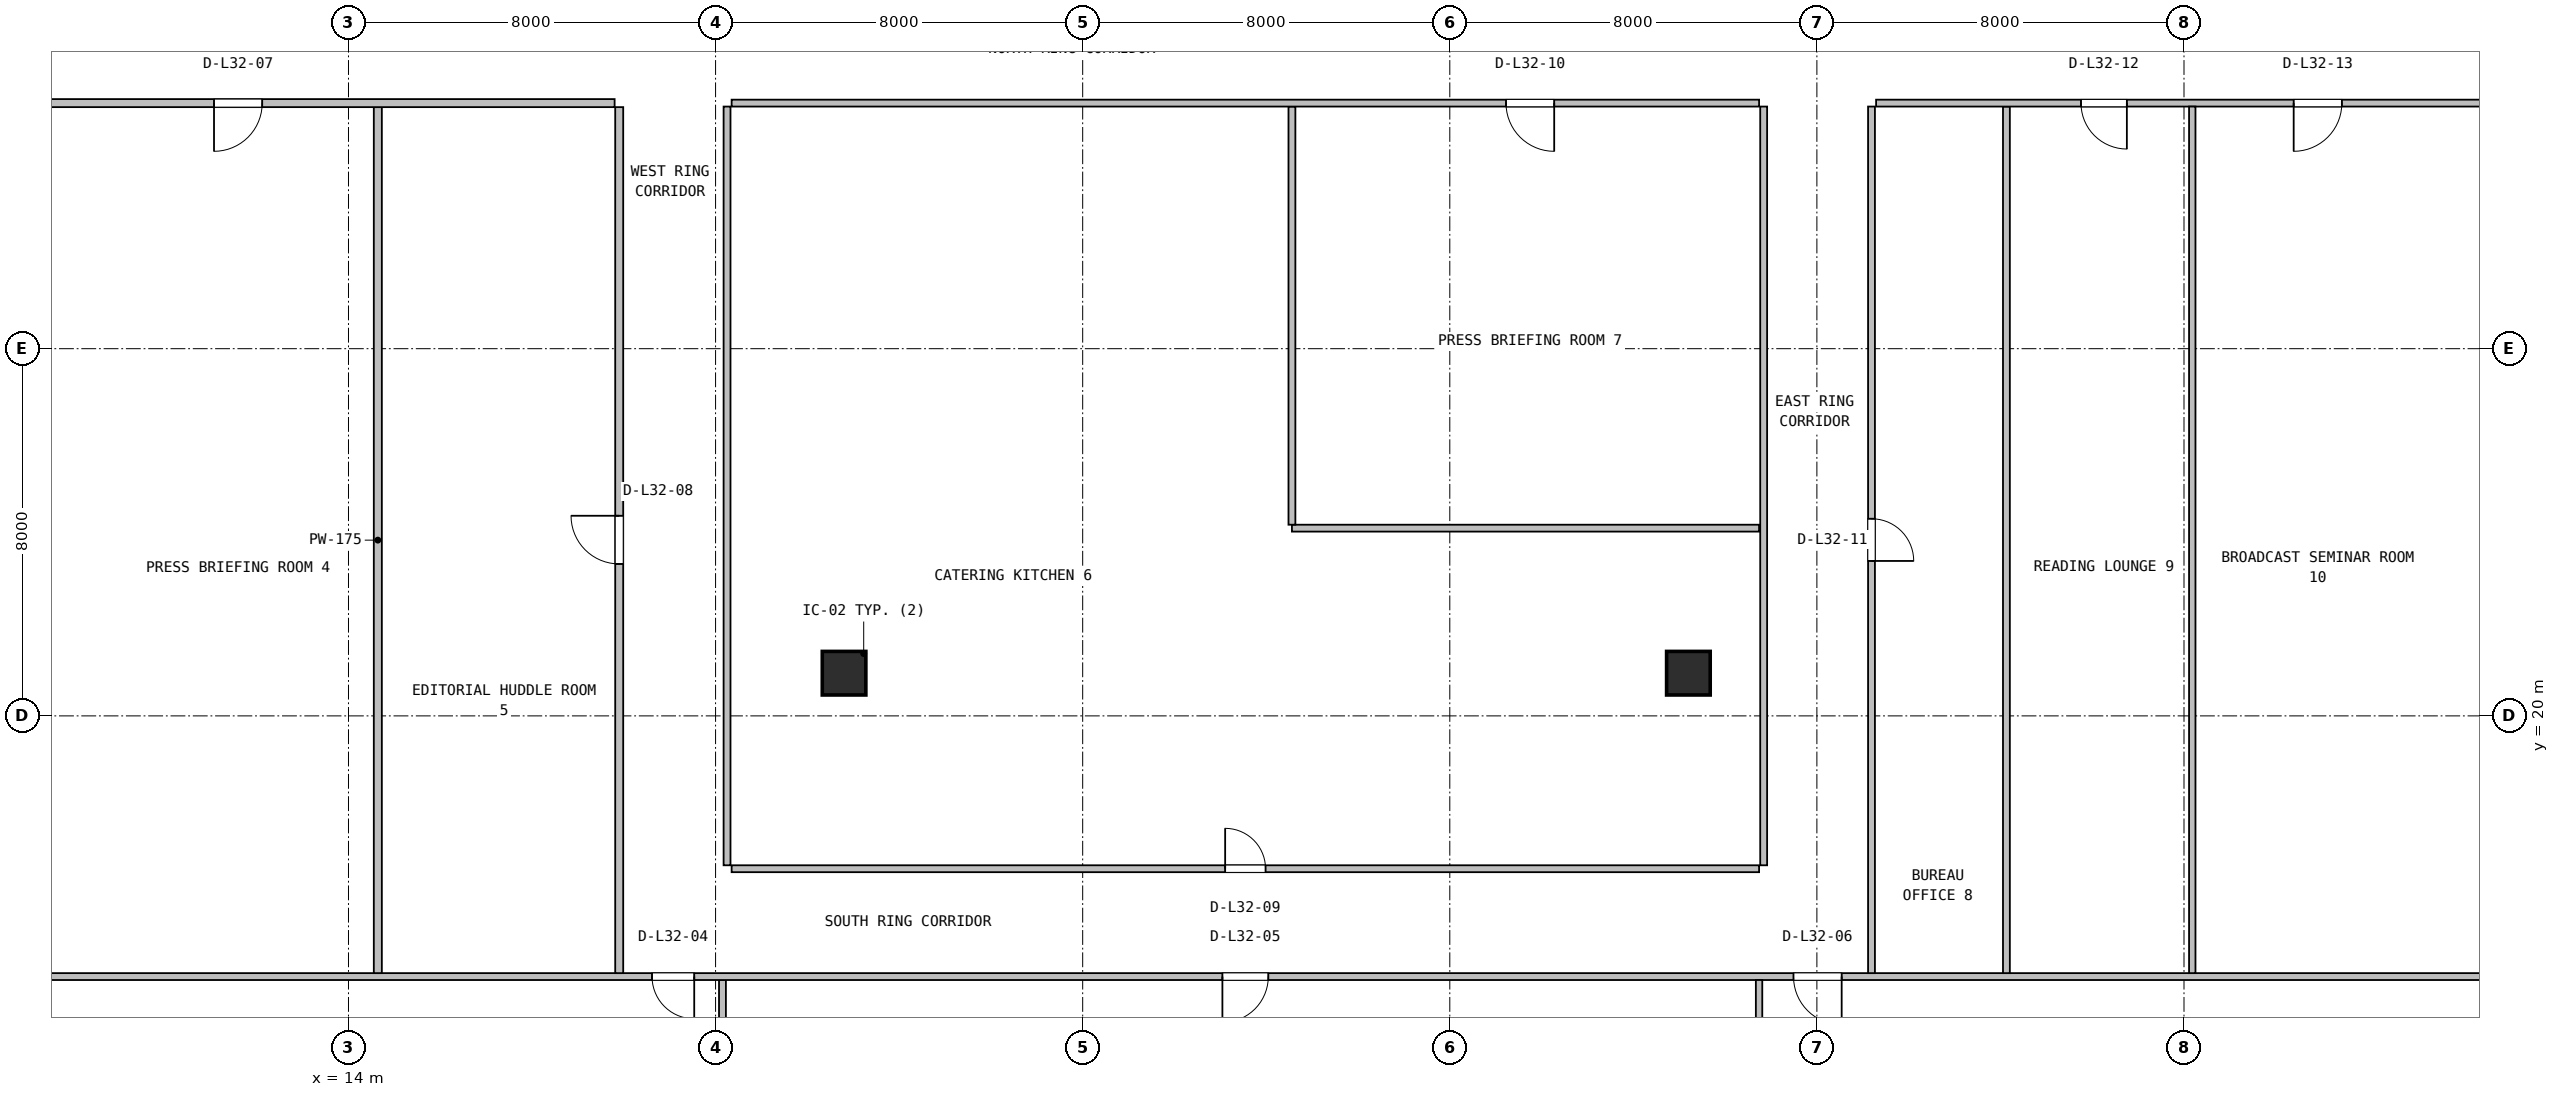
"""IFC4 building model, lengths in metres.
Left out: names, types, materials, properties, quantities, classifications, styles, units other than length and angle.
Written with IfcOpenShell. Run it as: python <this file> out.ifc"""

import sys

from ifc_helpers import new_model, si_unit, direction, frame, frame_2d, origin, origin_2d, place, context, subcontext, project, spatial, rectangle, extrude, source, transform, mapped, element, fill, save


model = new_model("IFC4")
c1 = context("Model", 3, precision=1e-05, world=origin(), true_north=direction((0.0, 1.0)))
c2 = subcontext(c1, "Body", "Model", "MODEL_VIEW")
j1 = project(units=[si_unit("LENGTHUNIT", "METRE"), si_unit("PLANEANGLEUNIT", "RADIAN")], contexts=[c1])
p1 = place(None, origin())
s1 = spatial("IfcSite", under=j1, at=p1, CompositionType="ELEMENT")
p2 = place(p1, origin())
s2 = spatial("IfcBuilding", under=s1, at=p2, CompositionType="ELEMENT")
p3 = place(p2, frame((0.0, 0.0, 133.4)))
s3 = spatial("IfcBuildingStorey", under=s2, at=p3, CompositionType="ELEMENT", Elevation=133.4)
m1 = source(origin(), c2, "Body", "SweptSolid", [
    extrude(rectangle(XDim=0.95, YDim=0.95, at=origin_2d()), origin(), (0.0, 0.0, 1.0), 3.8),
])
for number, where, z_axis, x_axis in (
    (1, (24.8, 20.93, 0.0), (0.0, 0.0, 1.0), (1.0, 0.0, 0.0)),
    (2, (43.2, 20.93, 0.0), (0.0, 0.0, 1.0), (1.0, 0.0, 0.0)),
):
    element("IfcColumn", number, at=place(p3, frame(where, z_axis=z_axis, x_axis=x_axis)), inside=s3, PredefinedType="COLUMN", context=c2, shape_type="MappedRepresentation", body=[
        mapped(m1, transform((0.0, 0.0, 0.0), x_axis=(1.0, 0.0, 0.0), y_axis=(0.0, 1.0, 0.0), z_axis=(0.0, 0.0, 1.0), scale=1.0)),
    ])
p4 = place(p3, frame((22.15, 4.38, 0.0), z_axis=(0.0, 0.0, 1.0), x_axis=(0.0, 1.0, 0.0)))
e3 = element("IfcWall", 3, at=p4, inside=s3, PredefinedType="PARTITIONING", context=c2, shape_type="SweptSolid", body=[
    extrude(rectangle(XDim=9.865, YDim=0.15, at=frame_2d((4.933, 0.0))), origin(), (0.0, 0.0, 1.0), 3.108),
])
p5 = place(p3, frame((4.68, 14.32, 0.0), z_axis=(0.0, 0.0, 1.0), x_axis=(1.0, 0.0, 0.0)))
e4 = element("IfcWall", 4, at=p5, inside=s3, PredefinedType="PARTITIONING", context=c2, shape_type="SweptSolid", body=[
    extrude(rectangle(XDim=58.64, YDim=0.15, at=frame_2d((29.32, 0.0))), origin(), (0.0, 0.0, 1.0), 2.83),
])
p6 = place(p5, frame((15.935, 0.0, 0.0)))
e5 = element("IfcOpeningElement", 5, at=p6, cuts=e4, PredefinedType="OPENING", context=c2, shape_type="SweptSolid", body=[
    extrude(rectangle(XDim=0.92, YDim=2.08, at=frame_2d((0.46, 1.04))), frame((0.0, 0.085, 0.0), z_axis=(0.0, -1.0, 0.0), x_axis=(1.0, 0.0, 0.0)), (0.0, 0.0, 1.0), 0.17),
])
p7 = place(p5, frame((28.365, 0.0, 0.0)))
e6 = element("IfcOpeningElement", 6, at=p7, cuts=e4, PredefinedType="OPENING", context=c2, shape_type="SweptSolid", body=[
    extrude(rectangle(XDim=1.0, YDim=2.1, at=frame_2d((0.5, 1.05))), frame((0.0, 0.085, 0.0), z_axis=(0.0, -1.0, 0.0), x_axis=(1.0, 0.0, 0.0)), (0.0, 0.0, 1.0), 0.17),
])
p8 = place(p5, frame((40.81, 0.0, 0.0)))
e7 = element("IfcOpeningElement", 7, at=p8, cuts=e4, PredefinedType="OPENING", context=c2, shape_type="SweptSolid", body=[
    extrude(rectangle(XDim=1.05, YDim=2.1, at=frame_2d((0.525, 1.05))), frame((0.0, 0.085, 0.0), z_axis=(0.0, -1.0, 0.0), x_axis=(1.0, 0.0, 0.0)), (0.0, 0.0, 1.0), 0.17),
])
p9 = place(p3, frame((44.74, 4.38, 0.0), z_axis=(0.0, 0.0, 1.0), x_axis=(0.0, 1.0, 0.0)))
e8 = element("IfcWall", 8, at=p9, inside=s3, PredefinedType="PARTITIONING", context=c2, shape_type="SweptSolid", body=[
    extrude(rectangle(XDim=9.865, YDim=0.14, at=frame_2d((4.933, 0.0))), origin(), (0.0, 0.0, 1.0), 3.108),
])
p10 = place(p3, frame((14.64, 14.395, 0.0), z_axis=(0.0, 0.0, 1.0), x_axis=(0.0, 1.0, 0.0)))
e9 = element("IfcWall", 9, at=p10, inside=s3, PredefinedType="PARTITIONING", context=c2, shape_type="SweptSolid", body=[
    extrude(rectangle(XDim=18.868, YDim=0.175, at=frame_2d((9.434, 0.0))), origin(), (0.0, 0.0, 1.0), 3.222),
])
p11 = place(p3, frame((4.68, 33.35, 0.0), z_axis=(0.0, 0.0, 1.0), x_axis=(1.0, 0.0, 0.0)))
e10 = element("IfcWall", 10, at=p11, inside=s3, PredefinedType="PARTITIONING", context=c2, shape_type="SweptSolid", body=[
    extrude(rectangle(XDim=15.12, YDim=0.175, at=frame_2d((7.56, 0.0))), origin(), (0.0, 0.0, 1.0), 3.108),
])
p12 = place(p11, frame((6.39, 0.0, 0.0)))
e11 = element("IfcOpeningElement", 11, at=p12, cuts=e10, PredefinedType="OPENING", context=c2, shape_type="SweptSolid", body=[
    extrude(rectangle(XDim=1.05, YDim=2.1, at=frame_2d((0.525, 1.05))), frame((0.0, 0.098, 0.0), z_axis=(0.0, -1.0, 0.0), x_axis=(1.0, 0.0, 0.0)), (0.0, 0.0, 1.0), 0.195),
])
p13 = place(p3, frame((19.9, 14.395, 0.0), z_axis=(0.0, 0.0, 1.0), x_axis=(0.0, 1.0, 0.0)))
e12 = element("IfcWall", 12, at=p13, inside=s3, PredefinedType="PARTITIONING", context=c2, shape_type="SweptSolid", body=[
    extrude(rectangle(XDim=18.868, YDim=0.175, at=frame_2d((9.434, 0.0))), origin(), (0.0, 0.0, 1.0), 3.222),
])
p14 = place(p13, frame((8.915, 0.0, 0.0)))
e13 = element("IfcOpeningElement", 13, at=p14, cuts=e12, PredefinedType="OPENING", context=c2, shape_type="SweptSolid", body=[
    extrude(rectangle(XDim=1.05, YDim=2.1, at=frame_2d((0.525, 1.05))), frame((0.0, 0.098, 0.0), z_axis=(0.0, -1.0, 0.0), x_axis=(1.0, 0.0, 0.0)), (0.0, 0.0, 1.0), 0.195),
])
p15 = place(p3, frame((22.35, 16.67, 0.0), z_axis=(0.0, 0.0, 1.0), x_axis=(1.0, 0.0, 0.0)))
e14 = element("IfcWall", 14, at=p15, inside=s3, PredefinedType="PARTITIONING", context=c2, shape_type="SweptSolid", body=[
    extrude(rectangle(XDim=22.39, YDim=0.15, at=frame_2d((11.195, 0.0))), origin(), (0.0, 0.0, 1.0), 2.83),
])
p16 = place(p15, frame((10.755, 0.0, 0.0)))
e15 = element("IfcOpeningElement", 15, at=p16, cuts=e14, PredefinedType="OPENING", context=c2, shape_type="SweptSolid", body=[
    extrude(rectangle(XDim=0.88, YDim=2.06, at=frame_2d((0.44, 1.03))), frame((0.0, 0.085, 0.0), z_axis=(0.0, -1.0, 0.0), x_axis=(1.0, 0.0, 0.0)), (0.0, 0.0, 1.0), 0.17),
])
p17 = place(p3, frame((44.84, 16.745, 0.0), z_axis=(0.0, 0.0, 1.0), x_axis=(0.0, 1.0, 0.0)))
e16 = element("IfcWall", 16, at=p17, inside=s3, PredefinedType="PARTITIONING", context=c2, shape_type="SweptSolid", body=[
    extrude(rectangle(XDim=16.53, YDim=0.15, at=frame_2d((8.265, 0.0))), origin(), (0.0, 0.0, 1.0), 3.222),
])
p18 = place(p3, frame((34.56, 24.09, 0.0), z_axis=(0.0, 0.0, 1.0), x_axis=(1.0, 0.0, 0.0)))
e17 = element("IfcWall", 17, at=p18, inside=s3, PredefinedType="PARTITIONING", context=c2, shape_type="SweptSolid", body=[
    extrude(rectangle(XDim=10.18, YDim=0.15, at=frame_2d((5.09, 0.0))), origin(), (0.0, 0.0, 1.0), 2.83),
])
p19 = place(p3, frame((34.56, 24.165, 0.0), z_axis=(0.0, 0.0, 1.0), x_axis=(0.0, 1.0, 0.0)))
e18 = element("IfcWall", 18, at=p19, inside=s3, PredefinedType="PARTITIONING", context=c2, shape_type="SweptSolid", body=[
    extrude(rectangle(XDim=9.11, YDim=0.15, at=frame_2d((4.555, 0.0))), origin(), (0.0, 0.0, 1.0), 3.222),
])
p20 = place(p3, frame((22.35, 33.35, 0.0), z_axis=(0.0, 0.0, 1.0), x_axis=(1.0, 0.0, 0.0)))
e19 = element("IfcWall", 19, at=p20, inside=s3, PredefinedType="PARTITIONING", context=c2, shape_type="SweptSolid", body=[
    extrude(rectangle(XDim=22.39, YDim=0.15, at=frame_2d((11.195, 0.0))), origin(), (0.0, 0.0, 1.0), 2.83),
])
p21 = place(p20, frame((16.875, 0.0, 0.0)))
e20 = element("IfcOpeningElement", 20, at=p21, cuts=e19, PredefinedType="OPENING", context=c2, shape_type="SweptSolid", body=[
    extrude(rectangle(XDim=1.05, YDim=2.1, at=frame_2d((0.525, 1.05))), frame((0.0, 0.085, 0.0), z_axis=(0.0, -1.0, 0.0), x_axis=(1.0, 0.0, 0.0)), (0.0, 0.0, 1.0), 0.17),
])
p22 = place(p3, frame((22.25, 16.745, 0.0), z_axis=(0.0, 0.0, 1.0), x_axis=(0.0, 1.0, 0.0)))
e21 = element("IfcWall", 21, at=p22, inside=s3, PredefinedType="PARTITIONING", context=c2, shape_type="SweptSolid", body=[
    extrude(rectangle(XDim=16.53, YDim=0.15, at=frame_2d((8.265, 0.0))), origin(), (0.0, 0.0, 1.0), 3.222),
])
p23 = place(p3, frame((50.13, 14.395, 0.0), z_axis=(0.0, 0.0, 1.0), x_axis=(0.0, 1.0, 0.0)))
e22 = element("IfcWall", 22, at=p23, inside=s3, PredefinedType="PARTITIONING", context=c2, shape_type="SweptSolid", body=[
    extrude(rectangle(XDim=18.88, YDim=0.15, at=frame_2d((9.44, 0.0))), origin(), (0.0, 0.0, 1.0), 3.222),
])
p24 = place(p3, frame((47.29, 33.35, 0.0), z_axis=(0.0, 0.0, 1.0), x_axis=(1.0, 0.0, 0.0)))
e23 = element("IfcWall", 23, at=p24, inside=s3, PredefinedType="PARTITIONING", context=c2, shape_type="SweptSolid", body=[
    extrude(rectangle(XDim=16.03, YDim=0.15, at=frame_2d((8.015, 0.0))), origin(), (0.0, 0.0, 1.0), 3.108),
])
p25 = place(p24, frame((4.465, 0.0, 0.0)))
e24 = element("IfcOpeningElement", 24, at=p25, cuts=e23, PredefinedType="OPENING", context=c2, shape_type="SweptSolid", body=[
    extrude(rectangle(XDim=1.0, YDim=2.1, at=frame_2d((0.5, 1.05))), frame((0.0, 0.085, 0.0), z_axis=(0.0, -1.0, 0.0), x_axis=(1.0, 0.0, 0.0)), (0.0, 0.0, 1.0), 0.17),
])
p26 = place(p24, frame((9.1, 0.0, 0.0)))
e25 = element("IfcOpeningElement", 25, at=p26, cuts=e23, PredefinedType="OPENING", context=c2, shape_type="SweptSolid", body=[
    extrude(rectangle(XDim=1.05, YDim=2.1, at=frame_2d((0.525, 1.05))), frame((0.0, 0.085, 0.0), z_axis=(0.0, -1.0, 0.0), x_axis=(1.0, 0.0, 0.0)), (0.0, 0.0, 1.0), 0.17),
])
p27 = place(p3, frame((47.19, 14.395, 0.0), z_axis=(0.0, 0.0, 1.0), x_axis=(0.0, 1.0, 0.0)))
e26 = element("IfcWall", 26, at=p27, inside=s3, PredefinedType="PARTITIONING", context=c2, shape_type="SweptSolid", body=[
    extrude(rectangle(XDim=18.88, YDim=0.15, at=frame_2d((9.44, 0.0))), origin(), (0.0, 0.0, 1.0), 3.222),
])
p28 = place(p27, frame((8.98, 0.0, 0.0)))
e27 = element("IfcOpeningElement", 27, at=p28, cuts=e26, PredefinedType="OPENING", context=c2, shape_type="SweptSolid", body=[
    extrude(rectangle(XDim=0.92, YDim=2.08, at=frame_2d((0.46, 1.04))), frame((0.0, 0.085, 0.0), z_axis=(0.0, -1.0, 0.0), x_axis=(1.0, 0.0, 0.0)), (0.0, 0.0, 1.0), 0.17),
])
p29 = place(p3, frame((54.18, 14.395, 0.0), z_axis=(0.0, 0.0, 1.0), x_axis=(0.0, 1.0, 0.0)))
e28 = element("IfcWall", 28, at=p29, inside=s3, PredefinedType="PARTITIONING", context=c2, shape_type="SweptSolid", body=[
    extrude(rectangle(XDim=18.88, YDim=0.14, at=frame_2d((9.44, 0.0))), origin(), (0.0, 0.0, 1.0), 3.222),
])
m2 = source(origin(), c2, "Body", "SweptSolid", [
    extrude(rectangle(XDim=0.92, YDim=2.08, at=frame_2d((0.46, 1.04))), frame((0.0, 0.025, 0.0), z_axis=(0.0, -1.0, 0.0), x_axis=(1.0, 0.0, 0.0)), (0.0, 0.0, 1.0), 0.05),
])
p30 = place(p6, frame((0.92, 0.0, 0.0), z_axis=(0.0, 0.0, 1.0), x_axis=(-1.0, 0.0, 0.0)))
e29 = element("IfcDoor", 29, at=p30, inside=s3, OperationType="SINGLE_SWING_RIGHT", PredefinedType="DOOR", context=c2, shape_type="MappedRepresentation", body=[
    mapped(m2, transform((0.0, 0.0, 0.0), x_axis=(1.0, 0.0, 0.0), y_axis=(0.0, 1.0, 0.0), z_axis=(0.0, 0.0, 1.0), scale=1.0)),
])
fill(e5, e29)
m3 = source(origin(), c2, "Body", "SweptSolid", [
    extrude(rectangle(XDim=1.0, YDim=2.1, at=frame_2d((0.5, 1.05))), frame((0.0, 0.025, 0.0), z_axis=(0.0, -1.0, 0.0), x_axis=(1.0, 0.0, 0.0)), (0.0, 0.0, 1.0), 0.05),
])
p31 = place(p7, frame((1.0, 0.0, 0.0), z_axis=(0.0, 0.0, 1.0), x_axis=(-1.0, 0.0, 0.0)))
e30 = element("IfcDoor", 30, at=p31, inside=s3, OperationType="SINGLE_SWING_LEFT", PredefinedType="DOOR", context=c2, shape_type="MappedRepresentation", body=[
    mapped(m3, transform((0.0, 0.0, 0.0), x_axis=(1.0, 0.0, 0.0), y_axis=(0.0, 1.0, 0.0), z_axis=(0.0, 0.0, 1.0), scale=1.0)),
])
fill(e6, e30)
m4 = source(origin(), c2, "Body", "SweptSolid", [
    extrude(rectangle(XDim=1.05, YDim=2.1, at=frame_2d((0.525, 1.05))), frame((0.0, 0.025, 0.0), z_axis=(0.0, -1.0, 0.0), x_axis=(1.0, 0.0, 0.0)), (0.0, 0.0, 1.0), 0.05),
])
p32 = place(p8, frame((1.05, 0.0, 0.0), z_axis=(0.0, 0.0, 1.0), x_axis=(-1.0, 0.0, 0.0)))
e31 = element("IfcDoor", 31, at=p32, inside=s3, OperationType="SINGLE_SWING_RIGHT", PredefinedType="DOOR", context=c2, shape_type="MappedRepresentation", body=[
    mapped(m4, transform((0.0, 0.0, 0.0), x_axis=(1.0, 0.0, 0.0), y_axis=(0.0, 1.0, 0.0), z_axis=(0.0, 0.0, 1.0), scale=1.0)),
])
fill(e7, e31)
p33 = place(p12, frame((1.05, 0.0, 0.0), z_axis=(0.0, 0.0, 1.0), x_axis=(-1.0, 0.0, 0.0)))
e32 = element("IfcDoor", 32, at=p33, inside=s3, OperationType="SINGLE_SWING_LEFT", PredefinedType="DOOR", context=c2, shape_type="MappedRepresentation", body=[
    mapped(m4, transform((0.0, 0.0, 0.0), x_axis=(1.0, 0.0, 0.0), y_axis=(0.0, 1.0, 0.0), z_axis=(0.0, 0.0, 1.0), scale=1.0)),
])
fill(e11, e32)
p34 = place(p14, origin())
e33 = element("IfcDoor", 33, at=p34, inside=s3, OperationType="SINGLE_SWING_RIGHT", PredefinedType="DOOR", context=c2, shape_type="MappedRepresentation", body=[
    mapped(m4, transform((0.0, 0.0, 0.0), x_axis=(1.0, 0.0, 0.0), y_axis=(0.0, 1.0, 0.0), z_axis=(0.0, 0.0, 1.0), scale=1.0)),
])
fill(e13, e33)
m5 = source(origin(), c2, "Body", "SweptSolid", [
    extrude(rectangle(XDim=0.88, YDim=2.06, at=frame_2d((0.44, 1.03))), frame((0.0, 0.025, 0.0), z_axis=(0.0, -1.0, 0.0), x_axis=(1.0, 0.0, 0.0)), (0.0, 0.0, 1.0), 0.05),
])
p35 = place(p16, origin())
e34 = element("IfcDoor", 34, at=p35, inside=s3, OperationType="SINGLE_SWING_LEFT", PredefinedType="DOOR", context=c2, shape_type="MappedRepresentation", body=[
    mapped(m5, transform((0.0, 0.0, 0.0), x_axis=(1.0, 0.0, 0.0), y_axis=(0.0, 1.0, 0.0), z_axis=(0.0, 0.0, 1.0), scale=1.0)),
])
fill(e15, e34)
p36 = place(p21, frame((1.05, 0.0, 0.0), z_axis=(0.0, 0.0, 1.0), x_axis=(-1.0, 0.0, 0.0)))
e35 = element("IfcDoor", 35, at=p36, inside=s3, OperationType="SINGLE_SWING_RIGHT", PredefinedType="DOOR", context=c2, shape_type="MappedRepresentation", body=[
    mapped(m4, transform((0.0, 0.0, 0.0), x_axis=(1.0, 0.0, 0.0), y_axis=(0.0, 1.0, 0.0), z_axis=(0.0, 0.0, 1.0), scale=1.0)),
])
fill(e20, e35)
p37 = place(p28, frame((0.92, 0.0, 0.0), z_axis=(0.0, 0.0, 1.0), x_axis=(-1.0, 0.0, 0.0)))
e36 = element("IfcDoor", 36, at=p37, inside=s3, OperationType="SINGLE_SWING_LEFT", PredefinedType="DOOR", context=c2, shape_type="MappedRepresentation", body=[
    mapped(m2, transform((0.0, 0.0, 0.0), x_axis=(1.0, 0.0, 0.0), y_axis=(0.0, 1.0, 0.0), z_axis=(0.0, 0.0, 1.0), scale=1.0)),
])
fill(e27, e36)
p38 = place(p25, frame((1.0, 0.0, 0.0), z_axis=(0.0, 0.0, 1.0), x_axis=(-1.0, 0.0, 0.0)))
e37 = element("IfcDoor", 37, at=p38, inside=s3, OperationType="SINGLE_SWING_RIGHT", PredefinedType="DOOR", context=c2, shape_type="MappedRepresentation", body=[
    mapped(m3, transform((0.0, 0.0, 0.0), x_axis=(1.0, 0.0, 0.0), y_axis=(0.0, 1.0, 0.0), z_axis=(0.0, 0.0, 1.0), scale=1.0)),
])
fill(e24, e37)
p39 = place(p26, frame((1.05, 0.0, 0.0), z_axis=(0.0, 0.0, 1.0), x_axis=(-1.0, 0.0, 0.0)))
e38 = element("IfcDoor", 38, at=p39, inside=s3, OperationType="SINGLE_SWING_LEFT", PredefinedType="DOOR", context=c2, shape_type="MappedRepresentation", body=[
    mapped(m4, transform((0.0, 0.0, 0.0), x_axis=(1.0, 0.0, 0.0), y_axis=(0.0, 1.0, 0.0), z_axis=(0.0, 0.0, 1.0), scale=1.0)),
])
fill(e25, e38)
save(model, sys.argv[1])
